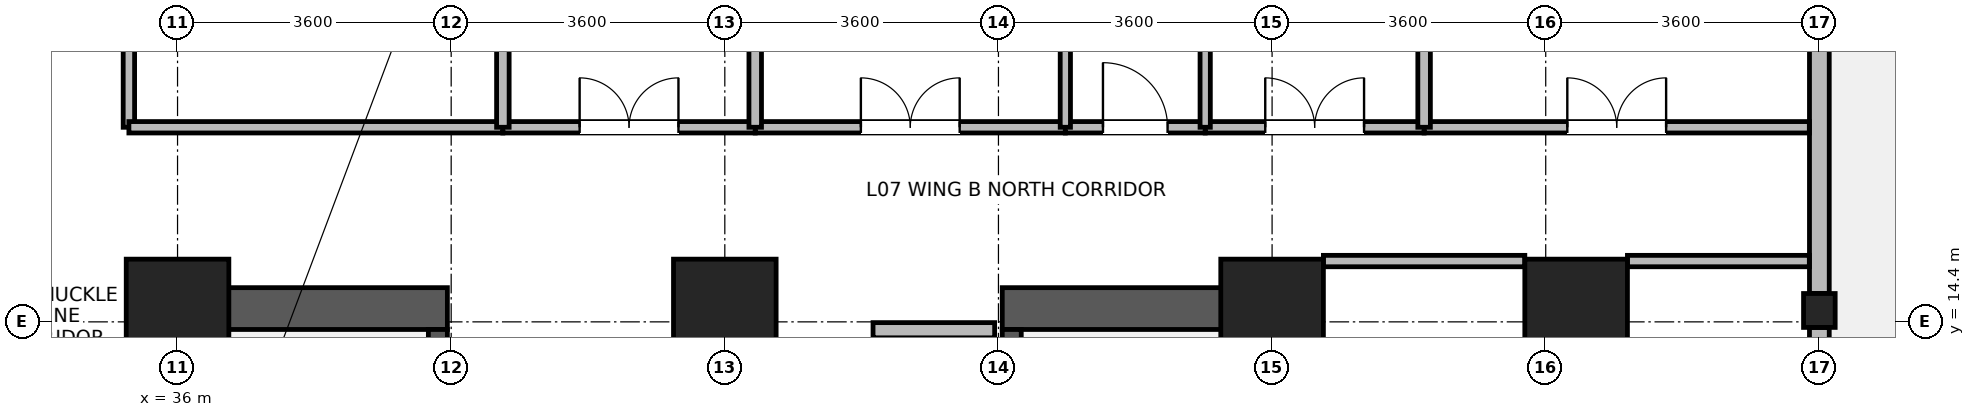
"""IFC4 building model, lengths in metres.
Left out: names, types, materials, properties, quantities, classifications, styles, units other than length and angle.
Written with IfcOpenShell. Run it as: python <this file> out.ifc"""

import sys

from ifc_helpers import new_model, si_unit, direction, frame, frame_2d, origin, origin_2d, place, context, subcontext, project, spatial, rectangle, i_section, extrude, source, transform, mapped, element, fill, save


model = new_model("IFC4")
c1 = context("Model", 3, precision=1e-05, world=origin(), true_north=direction((0.0, 1.0)))
c2 = subcontext(c1, "Body", "Model", "MODEL_VIEW")
j1 = project(units=[si_unit("LENGTHUNIT", "METRE"), si_unit("PLANEANGLEUNIT", "RADIAN")], contexts=[c1])
p1 = place(None, origin())
s1 = spatial("IfcSite", under=j1, at=p1, CompositionType="ELEMENT")
p2 = place(p1, origin())
s2 = spatial("IfcBuilding", under=s1, at=p2, CompositionType="ELEMENT")
p3 = place(p2, frame((0.0, 0.0, 32.7)))
s3 = spatial("IfcBuildingStorey", under=s2, at=p3, CompositionType="ELEMENT", Elevation=32.7)
for number, where, z_axis, x_axis in (
    (1, (36.075, 6.75, 0.0), (0.0, 0.0, 1.0), (0.0, 1.0, 0.0)),
    (2, (50.325, 6.75, 0.0), (0.0, 0.0, 1.0), (0.0, 1.0, 0.0)),
):
    element("IfcWall", number, at=place(p3, frame(where, z_axis=z_axis, x_axis=x_axis)), inside=s3, PredefinedType="SHEAR", context=c2, shape_type="SweptSolid", body=[
        extrude(rectangle(XDim=8.1, YDim=0.55, at=frame_2d((4.05, 0.0))), origin(), (0.0, 0.0, 1.0), 3.45),
    ])
for number, where, z_axis, x_axis in (
    (3, (36.35, 14.575, 0.0), (0.0, 0.0, 1.0), (1.0, 0.0, 0.0)),
    (4, (46.85, 14.575, 0.0), (0.0, 0.0, 1.0), (1.0, 0.0, 0.0)),
):
    element("IfcWall", number, at=place(p3, frame(where, z_axis=z_axis, x_axis=x_axis)), inside=s3, PredefinedType="SHEAR", context=c2, shape_type="SweptSolid", body=[
        extrude(rectangle(XDim=3.2, YDim=0.55, at=frame_2d((1.6, 0.0))), origin(), (0.0, 0.0, 1.0), 3.45),
    ])
p4 = place(p3, frame((39.425, 7.3, 0.0), z_axis=(0.0, 0.0, 1.0), x_axis=(0.0, 1.0, 0.0)))
e5 = element("IfcWall", 5, at=p4, inside=s3, PredefinedType="SHEAR", context=c2, shape_type="SweptSolid", body=[
    extrude(rectangle(XDim=7.0, YDim=0.25, at=frame_2d((3.5, 0.0))), origin(), (0.0, 0.0, 1.0), 3.45),
])
p5 = place(p4, frame((0.15, 0.0, 0.0)))
e6 = element("IfcOpeningElement", 6, at=p5, cuts=e5, PredefinedType="OPENING", context=c2, shape_type="SweptSolid", body=[
    extrude(rectangle(XDim=1.1, YDim=2.08, at=frame_2d((0.55, 1.04))), frame((0.0, 0.135, 0.0), z_axis=(0.0, -1.0, 0.0), x_axis=(1.0, 0.0, 0.0)), (0.0, 0.0, 1.0), 0.27),
])
p6 = place(p3, frame((46.975, 7.3, 0.0), z_axis=(0.0, 0.0, 1.0), x_axis=(0.0, 1.0, 0.0)))
e7 = element("IfcWall", 7, at=p6, inside=s3, PredefinedType="SHEAR", context=c2, shape_type="SweptSolid", body=[
    extrude(rectangle(XDim=7.0, YDim=0.25, at=frame_2d((3.5, 0.0))), origin(), (0.0, 0.0, 1.0), 3.45),
])
p7 = place(p6, frame((0.15, 0.0, 0.0)))
e8 = element("IfcOpeningElement", 8, at=p7, cuts=e7, PredefinedType="OPENING", context=c2, shape_type="SweptSolid", body=[
    extrude(rectangle(XDim=1.1, YDim=2.08, at=frame_2d((0.55, 1.04))), frame((0.0, 0.135, 0.0), z_axis=(0.0, -1.0, 0.0), x_axis=(1.0, 0.0, 0.0)), (0.0, 0.0, 1.0), 0.27),
])
m1 = source(origin(), c2, "Body", "SweptSolid", [
    extrude(rectangle(XDim=1.35, YDim=1.35, at=origin_2d()), origin(), (0.0, 0.0, 1.0), 3.7),
])
for number, where, z_axis, x_axis in (
    (9, (36.0, 14.55, 0.0), (0.0, 0.0, 1.0), (1.0, 0.0, 0.0)),
    (10, (43.2, 14.55, 0.0), (0.0, 0.0, 1.0), (1.0, 0.0, 0.0)),
    (11, (50.4, 14.55, 0.0), (0.0, 0.0, 1.0), (1.0, 0.0, 0.0)),
    (12, (54.4, 14.55, 0.0), (0.0, 0.0, 1.0), (1.0, 0.0, 0.0)),
):
    element("IfcColumn", number, at=place(p3, frame(where, z_axis=z_axis, x_axis=x_axis)), inside=s3, PredefinedType="COLUMN", context=c2, shape_type="MappedRepresentation", body=[
        mapped(m1, transform((0.0, 0.0, 0.0), x_axis=(1.0, 0.0, 0.0), y_axis=(0.0, 1.0, 0.0), z_axis=(0.0, 0.0, 1.0), scale=1.0)),
    ])
m2 = source(origin(), c2, "Body", "SweptSolid", [
    extrude(i_section(OverallWidth=0.416, OverallDepth=0.446, WebThickness=0.029, FlangeThickness=0.04, FilletRadius=0.015, at=origin_2d()), origin(), (0.0, 0.0, 1.0), 3.7),
])
p8 = place(p3, frame((57.6, 14.55, 0.0), z_axis=(0.0, 0.0, 1.0), x_axis=(1.0, 0.0, 0.0)))
e13 = element("IfcColumn", 13, at=p8, inside=s3, PredefinedType="COLUMN", context=c2, shape_type="MappedRepresentation", body=[
    mapped(m2, transform((0.0, 0.0, 0.0), x_axis=(1.0, 0.0, 0.0), y_axis=(0.0, 1.0, 0.0), z_axis=(0.0, 0.0, 1.0), scale=1.0)),
])
p9 = place(p3, frame((57.6, 14.326, 0.0), z_axis=(0.0, 0.0, 1.0), x_axis=(0.0, -1.0, 0.0)))
e14 = element("IfcWall", 14, at=p9, inside=s3, PredefinedType="STANDARD", context=c2, shape_type="SweptSolid", body=[
    extrude(rectangle(XDim=7.052, YDim=0.26, at=frame_2d((3.526, 0.0))), origin(), (0.0, 0.0, 1.0), 2.93),
])
p10 = place(p9, frame((0.863, 0.0, 0.85)))
e15 = element("IfcOpeningElement", 15, at=p10, cuts=e14, PredefinedType="OPENING", context=c2, shape_type="SweptSolid", body=[
    extrude(rectangle(XDim=1.8, YDim=1.85, at=frame_2d((0.9, 0.925))), frame((0.0, 0.14, 0.0), z_axis=(0.0, -1.0, 0.0), x_axis=(1.0, 0.0, 0.0)), (0.0, 0.0, 1.0), 0.28),
])
p11 = place(p9, frame((4.389, 0.0, 0.85)))
e16 = element("IfcOpeningElement", 16, at=p11, cuts=e14, PredefinedType="OPENING", context=c2, shape_type="SweptSolid", body=[
    extrude(rectangle(XDim=1.8, YDim=1.85, at=frame_2d((0.9, 0.925))), frame((0.0, 0.14, 0.0), z_axis=(0.0, -1.0, 0.0), x_axis=(1.0, 0.0, 0.0)), (0.0, 0.0, 1.0), 0.28),
])
p12 = place(p3, frame((57.6, 21.376, 0.0), z_axis=(0.0, 0.0, 1.0), x_axis=(0.0, -1.0, 0.0)))
e17 = element("IfcWall", 17, at=p12, inside=s3, PredefinedType="STANDARD", context=c2, shape_type="SweptSolid", body=[
    extrude(rectangle(XDim=6.602, YDim=0.26, at=frame_2d((3.301, 0.0))), origin(), (0.0, 0.0, 1.0), 2.93),
])
p13 = place(p12, frame((0.75, 0.0, 0.85)))
e18 = element("IfcOpeningElement", 18, at=p13, cuts=e17, PredefinedType="OPENING", context=c2, shape_type="SweptSolid", body=[
    extrude(rectangle(XDim=1.8, YDim=1.85, at=frame_2d((0.9, 0.925))), frame((0.0, 0.14, 0.0), z_axis=(0.0, -1.0, 0.0), x_axis=(1.0, 0.0, 0.0)), (0.0, 0.0, 1.0), 0.28),
])
p14 = place(p3, frame((45.15, 14.29, 0.0), z_axis=(0.0, 0.0, 1.0), x_axis=(1.0, 0.0, 0.0)))
e19 = element("IfcWall", 19, at=p14, inside=s3, PredefinedType="PARTITIONING", context=c2, shape_type="SweptSolid", body=[
    extrude(rectangle(XDim=1.6, YDim=0.2, at=frame_2d((0.8, 0.0))), origin(), (0.0, 0.0, 1.0), 2.23),
])
p15 = place(p3, frame((35.36, 16.96, 0.0), z_axis=(0.0, 0.0, 1.0), x_axis=(0.0, 1.0, 0.0)))
e20 = element("IfcWall", 20, at=p15, inside=s3, PredefinedType="PARTITIONING", context=c2, shape_type="SweptSolid", body=[
    extrude(rectangle(XDim=3.965, YDim=0.15, at=frame_2d((1.982, 0.0))), origin(), (0.0, 0.0, 1.0), 3.43),
])
p16 = place(p15, frame((1.333, 0.0, 0.0)))
e21 = element("IfcOpeningElement", 21, at=p16, cuts=e20, PredefinedType="OPENING", context=c2, shape_type="SweptSolid", body=[
    extrude(rectangle(XDim=1.3, YDim=2.12, at=frame_2d((0.65, 1.06))), frame((0.0, 0.085, 0.0), z_axis=(0.0, -1.0, 0.0), x_axis=(1.0, 0.0, 0.0)), (0.0, 0.0, 1.0), 0.17),
])
p17 = place(p3, frame((51.075, 15.2, 0.0), z_axis=(0.0, 0.0, 1.0), x_axis=(1.0, 0.0, 0.0)))
e22 = element("IfcWall", 22, at=p17, inside=s3, PredefinedType="PARTITIONING", context=c2, shape_type="SweptSolid", body=[
    extrude(rectangle(XDim=2.65, YDim=0.15, at=frame_2d((1.325, 0.0))), origin(), (0.0, 0.0, 1.0), 3.43),
])
p18 = place(p3, frame((55.075, 15.2, 0.0), z_axis=(0.0, 0.0, 1.0), x_axis=(1.0, 0.0, 0.0)))
e23 = element("IfcWall", 23, at=p18, inside=s3, PredefinedType="PARTITIONING", context=c2, shape_type="SweptSolid", body=[
    extrude(rectangle(XDim=2.393, YDim=0.15, at=frame_2d((1.197, 0.0))), origin(), (0.0, 0.0, 1.0), 3.43),
])
p19 = place(p3, frame((52.4, 16.96, 0.0), z_axis=(0.0, 0.0, 1.0), x_axis=(1.0, 0.0, 0.0)))
e24 = element("IfcWall", 24, at=p19, inside=s3, PredefinedType="PARTITIONING", context=c2, shape_type="SweptSolid", body=[
    extrude(rectangle(XDim=5.068, YDim=0.15, at=frame_2d((2.534, 0.0))), origin(), (0.0, 0.0, 1.0), 3.43),
])
p20 = place(p19, frame((1.884, 0.0, 0.0)))
e25 = element("IfcOpeningElement", 25, at=p20, cuts=e24, PredefinedType="OPENING", context=c2, shape_type="SweptSolid", body=[
    extrude(rectangle(XDim=1.3, YDim=2.12, at=frame_2d((0.65, 1.06))), frame((0.0, 0.085, 0.0), z_axis=(0.0, -1.0, 0.0), x_axis=(1.0, 0.0, 0.0)), (0.0, 0.0, 1.0), 0.17),
])
p21 = place(p3, frame((35.36, 16.96, 0.0), z_axis=(0.0, 0.0, 1.0), x_axis=(1.0, 0.0, 0.0)))
e26 = element("IfcWall", 26, at=p21, inside=s3, PredefinedType="PARTITIONING", context=c2, shape_type="SweptSolid", body=[
    extrude(rectangle(XDim=4.92, YDim=0.15, at=frame_2d((2.46, 0.0))), origin(), (0.0, 0.0, 1.0), 3.43),
])
p22 = place(p3, frame((43.6, 16.96, 0.0), z_axis=(0.0, 0.0, 1.0), x_axis=(1.0, 0.0, 0.0)))
e27 = element("IfcWall", 27, at=p22, inside=s3, PredefinedType="PARTITIONING", context=c2, shape_type="SweptSolid", body=[
    extrude(rectangle(XDim=4.08, YDim=0.15, at=frame_2d((2.04, 0.0))), origin(), (0.0, 0.0, 1.0), 3.43),
])
p23 = place(p22, frame((1.39, 0.0, 0.0)))
e28 = element("IfcOpeningElement", 28, at=p23, cuts=e27, PredefinedType="OPENING", context=c2, shape_type="SweptSolid", body=[
    extrude(rectangle(XDim=1.3, YDim=2.12, at=frame_2d((0.65, 1.06))), frame((0.0, 0.085, 0.0), z_axis=(0.0, -1.0, 0.0), x_axis=(1.0, 0.0, 0.0)), (0.0, 0.0, 1.0), 0.17),
])
p24 = place(p3, frame((40.28, 16.96, 0.0), z_axis=(0.0, 0.0, 1.0), x_axis=(1.0, 0.0, 0.0)))
e29 = element("IfcWall", 29, at=p24, inside=s3, PredefinedType="PARTITIONING", context=c2, shape_type="SweptSolid", body=[
    extrude(rectangle(XDim=3.32, YDim=0.15, at=frame_2d((1.66, 0.0))), origin(), (0.0, 0.0, 1.0), 3.43),
])
p25 = place(p24, frame((1.01, 0.0, 0.0)))
e30 = element("IfcOpeningElement", 30, at=p25, cuts=e29, PredefinedType="OPENING", context=c2, shape_type="SweptSolid", body=[
    extrude(rectangle(XDim=1.3, YDim=2.12, at=frame_2d((0.65, 1.06))), frame((0.0, 0.085, 0.0), z_axis=(0.0, -1.0, 0.0), x_axis=(1.0, 0.0, 0.0)), (0.0, 0.0, 1.0), 0.17),
])
p26 = place(p3, frame((49.52, 16.96, 0.0), z_axis=(0.0, 0.0, 1.0), x_axis=(1.0, 0.0, 0.0)))
e31 = element("IfcWall", 31, at=p26, inside=s3, PredefinedType="PARTITIONING", context=c2, shape_type="SweptSolid", body=[
    extrude(rectangle(XDim=2.88, YDim=0.15, at=frame_2d((1.44, 0.0))), origin(), (0.0, 0.0, 1.0), 3.43),
])
p27 = place(p26, frame((0.79, 0.0, 0.0)))
e32 = element("IfcOpeningElement", 32, at=p27, cuts=e31, PredefinedType="OPENING", context=c2, shape_type="SweptSolid", body=[
    extrude(rectangle(XDim=1.3, YDim=2.12, at=frame_2d((0.65, 1.06))), frame((0.0, 0.085, 0.0), z_axis=(0.0, -1.0, 0.0), x_axis=(1.0, 0.0, 0.0)), (0.0, 0.0, 1.0), 0.17),
])
p28 = place(p3, frame((47.68, 16.96, 0.0), z_axis=(0.0, 0.0, 1.0), x_axis=(1.0, 0.0, 0.0)))
e33 = element("IfcWall", 33, at=p28, inside=s3, PredefinedType="PARTITIONING", context=c2, shape_type="SweptSolid", body=[
    extrude(rectangle(XDim=1.84, YDim=0.15, at=frame_2d((0.92, 0.0))), origin(), (0.0, 0.0, 1.0), 3.43),
])
p29 = place(p28, frame((0.495, 0.0, 0.0)))
e34 = element("IfcOpeningElement", 34, at=p29, cuts=e33, PredefinedType="OPENING", context=c2, shape_type="SweptSolid", body=[
    extrude(rectangle(XDim=0.85, YDim=2.04, at=frame_2d((0.425, 1.02))), frame((0.0, 0.085, 0.0), z_axis=(0.0, -1.0, 0.0), x_axis=(1.0, 0.0, 0.0)), (0.0, 0.0, 1.0), 0.17),
])
for number, where, z_axis, x_axis in (
    (35, (40.28, 16.96, 0.0), (0.0, 0.0, 1.0), (0.0, 1.0, 0.0)),
    (36, (43.6, 16.96, 0.0), (0.0, 0.0, 1.0), (0.0, 1.0, 0.0)),
):
    element("IfcWall", number, at=place(p3, frame(where, z_axis=z_axis, x_axis=x_axis)), inside=s3, PredefinedType="PARTITIONING", context=c2, shape_type="SweptSolid", body=[
        extrude(rectangle(XDim=9.8, YDim=0.165, at=frame_2d((4.9, 0.0))), origin(), (0.0, 0.0, 1.0), 3.43),
    ])
for number, where, z_axis, x_axis in (
    (37, (47.68, 16.96, 0.0), (0.0, 0.0, 1.0), (0.0, 1.0, 0.0)),
    (38, (49.52, 16.96, 0.0), (0.0, 0.0, 1.0), (0.0, 1.0, 0.0)),
):
    element("IfcWall", number, at=place(p3, frame(where, z_axis=z_axis, x_axis=x_axis)), inside=s3, PredefinedType="PARTITIONING", context=c2, shape_type="SweptSolid", body=[
        extrude(rectangle(XDim=9.8, YDim=0.135, at=frame_2d((4.9, 0.0))), origin(), (0.0, 0.0, 1.0), 3.43),
    ])
p30 = place(p3, frame((52.4, 16.96, 0.0), z_axis=(0.0, 0.0, 1.0), x_axis=(0.0, 1.0, 0.0)))
e39 = element("IfcWall", 39, at=p30, inside=s3, PredefinedType="PARTITIONING", context=c2, shape_type="SweptSolid", body=[
    extrude(rectangle(XDim=9.8, YDim=0.165, at=frame_2d((4.9, 0.0))), origin(), (0.0, 0.0, 1.0), 3.43),
])
p31 = place(p20, origin())
e40 = element("IfcDoor", 40, at=p31, inside=s3, OperationType="DOUBLE_DOOR_SINGLE_SWING", PredefinedType="DOOR", context=c2, shape_type="SweptSolid", body=[
    extrude(rectangle(XDim=1.3, YDim=2.12, at=frame_2d((0.65, 1.06))), frame((0.0, 0.025, 0.0), z_axis=(0.0, -1.0, 0.0), x_axis=(1.0, 0.0, 0.0)), (0.0, 0.0, 1.0), 0.05),
])
fill(e25, e40)
p32 = place(p23, origin())
e41 = element("IfcDoor", 41, at=p32, inside=s3, OperationType="DOUBLE_DOOR_SINGLE_SWING", PredefinedType="DOOR", context=c2, shape_type="SweptSolid", body=[
    extrude(rectangle(XDim=1.3, YDim=2.12, at=frame_2d((0.65, 1.06))), frame((0.0, 0.025, 0.0), z_axis=(0.0, -1.0, 0.0), x_axis=(1.0, 0.0, 0.0)), (0.0, 0.0, 1.0), 0.05),
])
fill(e28, e41)
p33 = place(p25, origin())
e42 = element("IfcDoor", 42, at=p33, inside=s3, OperationType="DOUBLE_DOOR_SINGLE_SWING", PredefinedType="DOOR", context=c2, shape_type="SweptSolid", body=[
    extrude(rectangle(XDim=1.3, YDim=2.12, at=frame_2d((0.65, 1.06))), frame((0.0, 0.025, 0.0), z_axis=(0.0, -1.0, 0.0), x_axis=(1.0, 0.0, 0.0)), (0.0, 0.0, 1.0), 0.05),
])
fill(e30, e42)
p34 = place(p27, origin())
e43 = element("IfcDoor", 43, at=p34, inside=s3, OperationType="DOUBLE_DOOR_SINGLE_SWING", PredefinedType="DOOR", context=c2, shape_type="SweptSolid", body=[
    extrude(rectangle(XDim=1.3, YDim=2.12, at=frame_2d((0.65, 1.06))), frame((0.0, 0.025, 0.0), z_axis=(0.0, -1.0, 0.0), x_axis=(1.0, 0.0, 0.0)), (0.0, 0.0, 1.0), 0.05),
])
fill(e32, e43)
p35 = place(p29, origin())
e44 = element("IfcDoor", 44, at=p35, inside=s3, OperationType="SINGLE_SWING_LEFT", PredefinedType="DOOR", context=c2, shape_type="SweptSolid", body=[
    extrude(rectangle(XDim=0.85, YDim=2.04, at=frame_2d((0.425, 1.02))), frame((0.0, 0.025, 0.0), z_axis=(0.0, -1.0, 0.0), x_axis=(1.0, 0.0, 0.0)), (0.0, 0.0, 1.0), 0.05),
])
fill(e34, e44)
save(model, sys.argv[1])
